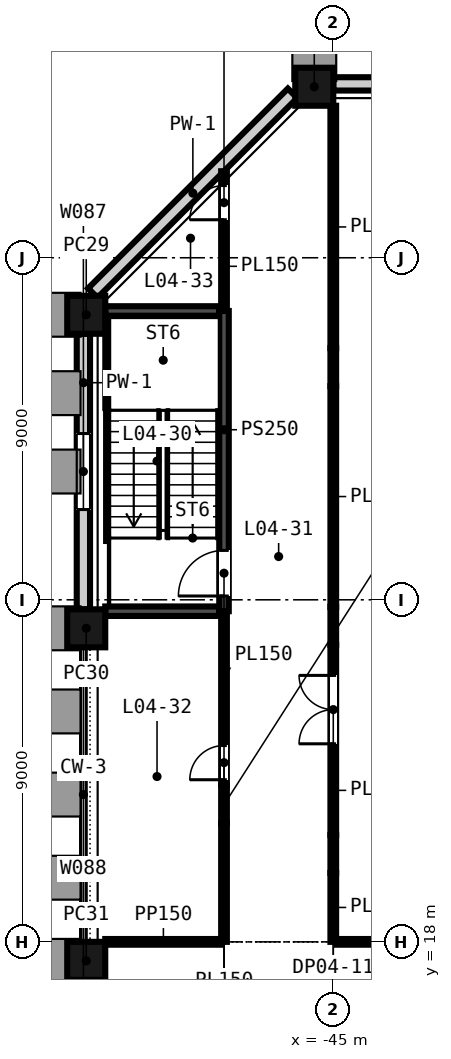
"""IFC4 building model, lengths in metres.
Left out: names, types, materials, properties, quantities, classifications, styles, units other than length and angle.
Written with IfcOpenShell. Run it as: python <this file> out.ifc"""

import sys

from ifc_helpers import new_model, si_unit, direction, frame, frame_2d, origin, origin_2d, place, context, subcontext, project, spatial, rectangle, extrude, element, fill, save


model = new_model("IFC4")
c1 = context("Model", 3, precision=1e-05, world=origin(), true_north=direction((0.0, 1.0)))
c2 = subcontext(c1, "Body", "Model", "MODEL_VIEW")
j1 = project(units=[si_unit("LENGTHUNIT", "METRE"), si_unit("PLANEANGLEUNIT", "RADIAN")], contexts=[c1])
p1 = place(None, origin())
s1 = spatial("IfcSite", under=j1, at=p1, CompositionType="ELEMENT")
p2 = place(p1, origin())
s2 = spatial("IfcBuilding", under=s1, at=p2, CompositionType="ELEMENT")
p3 = place(p2, frame((0.0, 0.0, 27.0)))
s3 = spatial("IfcBuildingStorey", under=s2, at=p3, CompositionType="ELEMENT", Elevation=27.0)
for number, where, z_axis, x_axis in (
    (1, (-45.5, 40.5, -0.3), (0.0, 0.0, 1.0), (-1.0, 0.0, 0.0)),
    (2, (-51.5, 34.5, -0.3), (0.0, 0.0, 1.0), (0.0, -1.0, 0.0)),
    (3, (-51.5, 26.25, -0.3), (0.0, 0.0, 1.0), (0.0, -1.0, 0.0)),
    (4, (-51.5, 17.5, -0.3), (0.0, 0.0, 1.0), (0.0, -1.0, 0.0)),
):
    element("IfcColumn", number, at=place(p3, frame(where, z_axis=z_axis, x_axis=x_axis)), inside=s3, PredefinedType="COLUMN", context=c2, shape_type="SweptSolid", body=[
        extrude(rectangle(XDim=1.0, YDim=1.0, at=origin_2d()), origin(), (0.0, 0.0, 1.0), 4.5),
    ])
p4 = place(p3, frame((-37.3, 40.575, -0.3), z_axis=(0.0, 0.0, 1.0), x_axis=(-1.0, 0.0, 0.0)))
e5 = element("IfcWall", 5, at=p4, inside=s3, PredefinedType="SOLIDWALL", context=c2, shape_type="SweptSolid", body=[
    extrude(rectangle(XDim=7.7, YDim=0.35, at=frame_2d((3.85, 0.0))), origin(), (0.0, 0.0, 1.0), 3.6),
])
p5 = place(p4, frame((2.85, 0.0, 1.2)))
e6 = element("IfcOpeningElement", 6, at=p5, cuts=e5, PredefinedType="OPENING", context=c2, shape_type="SweptSolid", body=[
    extrude(rectangle(XDim=2.0, YDim=2.35, at=frame_2d((1.0, 1.175))), frame((0.0, 0.185, 0.0), z_axis=(0.0, -1.0, 0.0), x_axis=(1.0, 0.0, 0.0)), (0.0, 0.0, 1.0), 0.37),
])
p6 = place(p3, frame((-46.072, 40.327, -0.3), z_axis=(0.0, 0.0, 1.0), x_axis=(-0.707106781187, -0.707106781187, 0.0)))
e7 = element("IfcWall", 7, at=p6, inside=s3, PredefinedType="SOLIDWALL", context=c2, shape_type="SweptSolid", body=[
    extrude(rectangle(XDim=7.433, YDim=0.35, at=frame_2d((3.716, 0.0))), origin(), (0.0, 0.0, 1.0), 3.6),
])
p7 = place(p3, frame((-51.575, 34.0, -0.3), z_axis=(0.0, 0.0, 1.0), x_axis=(0.0, -1.0, 0.0)))
e8 = element("IfcWall", 8, at=p7, inside=s3, PredefinedType="SOLIDWALL", context=c2, shape_type="SweptSolid", body=[
    extrude(rectangle(XDim=7.25, YDim=0.35, at=frame_2d((3.625, 0.0))), origin(), (0.0, 0.0, 1.0), 3.6),
])
p8 = place(p7, frame((2.625, 0.0, 1.2)))
e9 = element("IfcOpeningElement", 9, at=p8, cuts=e8, PredefinedType="OPENING", context=c2, shape_type="SweptSolid", body=[
    extrude(rectangle(XDim=2.0, YDim=2.35, at=frame_2d((1.0, 1.175))), frame((0.0, 0.185, 0.0), z_axis=(0.0, -1.0, 0.0), x_axis=(1.0, 0.0, 0.0)), (0.0, 0.0, 1.0), 0.37),
])
p9 = place(p3, frame((-51.0, 18.0, 0.0), z_axis=(0.0, 0.0, 1.0), x_axis=(1.0, 0.0, 0.0)))
e10 = element("IfcWall", 10, at=p9, inside=s3, PredefinedType="PARTITIONING", context=c2, shape_type="SweptSolid", body=[
    extrude(rectangle(XDim=3.05, YDim=0.15, at=frame_2d((1.525, 0.0))), origin(), (0.0, 0.0, 1.0), 4.2),
])
p10 = place(p3, frame((-44.925, 18.0, 0.0), z_axis=(0.0, 0.0, 1.0), x_axis=(1.0, 0.0, 0.0)))
e11 = element("IfcWall", 11, at=p10, inside=s3, PredefinedType="PARTITIONING", context=c2, shape_type="SweptSolid", body=[
    extrude(rectangle(XDim=4.353, YDim=0.15, at=frame_2d((2.176, 0.0))), origin(), (0.0, 0.0, 1.0), 4.2),
])
p11 = place(p10, frame((2.4, 0.0, 0.0)))
e12 = element("IfcOpeningElement", 12, at=p11, cuts=e11, PredefinedType="OPENING", context=c2, shape_type="SweptSolid", body=[
    extrude(rectangle(XDim=1.8, YDim=2.4, at=frame_2d((0.9, 1.2))), frame((0.0, 0.085, 0.0), z_axis=(0.0, -1.0, 0.0), x_axis=(1.0, 0.0, 0.0)), (0.0, 0.0, 1.0), 0.17),
])
for number, where, z_axis, x_axis in (
    (13, (-51.0, 26.7, 0.0), (0.0, 0.0, 1.0), (1.0, 0.0, 0.0)),
    (14, (-51.0, 34.6, 0.0), (0.0, 0.0, 1.0), (1.0, 0.0, 0.0)),
):
    element("IfcWall", number, at=place(p3, frame(where, z_axis=z_axis, x_axis=x_axis)), inside=s3, PredefinedType="SHEAR", context=c2, shape_type="SweptSolid", body=[
        extrude(rectangle(XDim=3.0, YDim=0.25, at=frame_2d((1.5, 0.0))), origin(), (0.0, 0.0, 1.0), 4.2),
    ])
p12 = place(p3, frame((-47.875, 18.0, 0.0), z_axis=(0.0, 0.0, 1.0), x_axis=(0.0, 1.0, 0.0)))
e15 = element("IfcWall", 15, at=p12, inside=s3, PredefinedType="PARTITIONING", context=c2, shape_type="SweptSolid", body=[
    extrude(rectangle(XDim=3.116, YDim=0.15, at=frame_2d((1.558, 0.0))), origin(), (0.0, 0.0, 1.0), 4.2),
])
p13 = place(p3, frame((-47.875, 21.116, 0.0), z_axis=(0.0, 0.0, 1.0), x_axis=(0.0, 1.0, 0.0)))
e16 = element("IfcWall", 16, at=p13, inside=s3, PredefinedType="PARTITIONING", context=c2, shape_type="SweptSolid", body=[
    extrude(rectangle(XDim=1.0, YDim=0.15, at=frame_2d((0.5, 0.0))), origin(), (0.0, 0.0, 1.0), 3.111),
])
p14 = place(p3, frame((-47.875, 22.116, 0.0), z_axis=(0.0, 0.0, 1.0), x_axis=(0.0, 1.0, 0.0)))
e17 = element("IfcWall", 17, at=p14, inside=s3, PredefinedType="PARTITIONING", context=c2, shape_type="SweptSolid", body=[
    extrude(rectangle(XDim=4.584, YDim=0.15, at=frame_2d((2.292, 0.0))), origin(), (0.0, 0.0, 1.0), 4.2),
])
p15 = place(p14, frame((0.15, 0.0, 0.0)))
e18 = element("IfcOpeningElement", 18, at=p15, cuts=e17, PredefinedType="OPENING", context=c2, shape_type="SweptSolid", body=[
    extrude(rectangle(XDim=0.9, YDim=2.1, at=frame_2d((0.45, 1.05))), frame((0.0, 0.085, 0.0), z_axis=(0.0, -1.0, 0.0), x_axis=(1.0, 0.0, 0.0)), (0.0, 0.0, 1.0), 0.17),
])
p16 = place(p3, frame((-47.875, 26.7, 0.0), z_axis=(0.0, 0.0, 1.0), x_axis=(0.0, 1.0, 0.0)))
e19 = element("IfcWall", 19, at=p16, inside=s3, PredefinedType="SHEAR", context=c2, shape_type="SweptSolid", body=[
    extrude(rectangle(XDim=7.9, YDim=0.25, at=frame_2d((3.95, 0.0))), origin(), (0.0, 0.0, 1.0), 4.2),
])
p17 = place(p16, frame((0.4, 0.0, 0.0)))
e20 = element("IfcOpeningElement", 20, at=p17, cuts=e19, PredefinedType="OPENING", context=c2, shape_type="SweptSolid", body=[
    extrude(rectangle(XDim=1.2, YDim=2.1, at=frame_2d((0.6, 1.05))), frame((0.0, 0.135, 0.0), z_axis=(0.0, -1.0, 0.0), x_axis=(1.0, 0.0, 0.0)), (0.0, 0.0, 1.0), 0.27),
])
p18 = place(p3, frame((-47.875, 34.6, 0.0), z_axis=(0.0, 0.0, 1.0), x_axis=(0.0, 1.0, 0.0)))
e21 = element("IfcWall", 21, at=p18, inside=s3, PredefinedType="PARTITIONING", context=c2, shape_type="SweptSolid", body=[
    extrude(rectangle(XDim=3.677, YDim=0.15, at=frame_2d((1.838, 0.0))), origin(), (0.0, 0.0, 1.0), 3.667),
])
p19 = place(p18, frame((2.4, 0.0, 0.0)))
e22 = element("IfcOpeningElement", 22, at=p19, cuts=e21, PredefinedType="OPENING", context=c2, shape_type="SweptSolid", body=[
    extrude(rectangle(XDim=0.9, YDim=2.1, at=frame_2d((0.45, 1.05))), frame((0.0, 0.085, 0.0), z_axis=(0.0, -1.0, 0.0), x_axis=(1.0, 0.0, 0.0)), (0.0, 0.0, 1.0), 0.17),
])
p20 = place(p3, frame((-45.0, 18.0, 0.0), z_axis=(0.0, 0.0, 1.0), x_axis=(0.0, 1.0, 0.0)))
e23 = element("IfcWall", 23, at=p20, inside=s3, PredefinedType="PARTITIONING", context=c2, shape_type="SweptSolid", body=[
    extrude(rectangle(XDim=1.811, YDim=0.15, at=frame_2d((0.906, 0.0))), origin(), (0.0, 0.0, 1.0), 4.2),
])
p21 = place(p3, frame((-45.0, 19.811, 0.0), z_axis=(0.0, 0.0, 1.0), x_axis=(0.0, 1.0, 0.0)))
e24 = element("IfcWall", 24, at=p21, inside=s3, PredefinedType="PARTITIONING", context=c2, shape_type="SweptSolid", body=[
    extrude(rectangle(XDim=1.0, YDim=0.15, at=frame_2d((0.5, 0.0))), origin(), (0.0, 0.0, 1.0), 3.111),
])
p22 = place(p3, frame((-45.0, 20.811, 0.0), z_axis=(0.0, 0.0, 1.0), x_axis=(0.0, 1.0, 0.0)))
e25 = element("IfcWall", 25, at=p22, inside=s3, PredefinedType="PARTITIONING", context=c2, shape_type="SweptSolid", body=[
    extrude(rectangle(XDim=5.002, YDim=0.15, at=frame_2d((2.501, 0.0))), origin(), (0.0, 0.0, 1.0), 4.2),
])
p23 = place(p22, frame((2.4, 0.0, 0.0)))
e26 = element("IfcOpeningElement", 26, at=p23, cuts=e25, PredefinedType="OPENING", context=c2, shape_type="SweptSolid", body=[
    extrude(rectangle(XDim=1.8, YDim=2.4, at=frame_2d((0.9, 1.2))), frame((0.0, 0.085, 0.0), z_axis=(0.0, -1.0, 0.0), x_axis=(1.0, 0.0, 0.0)), (0.0, 0.0, 1.0), 0.17),
])
p24 = place(p3, frame((-45.0, 25.813, 0.0), z_axis=(0.0, 0.0, 1.0), x_axis=(0.0, 1.0, 0.0)))
e27 = element("IfcWall", 27, at=p24, inside=s3, PredefinedType="PARTITIONING", context=c2, shape_type="SweptSolid", body=[
    extrude(rectangle(XDim=1.0, YDim=0.15, at=frame_2d((0.5, 0.0))), origin(), (0.0, 0.0, 1.0), 3.111),
])
p25 = place(p3, frame((-45.0, 26.813, 0.0), z_axis=(0.0, 0.0, 1.0), x_axis=(0.0, 1.0, 0.0)))
e28 = element("IfcWall", 28, at=p25, inside=s3, PredefinedType="PARTITIONING", context=c2, shape_type="SweptSolid", body=[
    extrude(rectangle(XDim=5.808, YDim=0.15, at=frame_2d((2.904, 0.0))), origin(), (0.0, 0.0, 1.0), 4.2),
])
p26 = place(p3, frame((-45.0, 32.621, 0.0), z_axis=(0.0, 0.0, 1.0), x_axis=(0.0, 1.0, 0.0)))
e29 = element("IfcWall", 29, at=p26, inside=s3, PredefinedType="PARTITIONING", context=c2, shape_type="SweptSolid", body=[
    extrude(rectangle(XDim=1.0, YDim=0.15, at=frame_2d((0.5, 0.0))), origin(), (0.0, 0.0, 1.0), 3.111),
])
p27 = place(p3, frame((-45.0, 33.621, 0.0), z_axis=(0.0, 0.0, 1.0), x_axis=(0.0, 1.0, 0.0)))
e30 = element("IfcWall", 30, at=p27, inside=s3, PredefinedType="PARTITIONING", context=c2, shape_type="SweptSolid", body=[
    extrude(rectangle(XDim=6.379, YDim=0.15, at=frame_2d((3.189, 0.0))), origin(), (0.0, 0.0, 1.0), 4.2),
])
p28 = place(p8, origin())
e31 = element("IfcWindow", 31, at=p28, inside=s3, PartitioningType="SINGLE_PANEL", PredefinedType="WINDOW", context=c2, shape_type="SweptSolid", body=[
    extrude(rectangle(XDim=2.0, YDim=2.35, at=frame_2d((1.0, 1.175))), frame((0.0, 0.03, 0.0), z_axis=(0.0, -1.0, 0.0), x_axis=(1.0, 0.0, 0.0)), (0.0, 0.0, 1.0), 0.06),
])
fill(e9, e31)
p29 = place(p17, origin())
e32 = element("IfcDoor", 32, at=p29, inside=s3, OperationType="SINGLE_SWING_LEFT", PredefinedType="DOOR", context=c2, shape_type="SweptSolid", body=[
    extrude(rectangle(XDim=1.2, YDim=2.1, at=frame_2d((0.6, 1.05))), frame((0.0, 0.025, 0.0), z_axis=(0.0, -1.0, 0.0), x_axis=(1.0, 0.0, 0.0)), (0.0, 0.0, 1.0), 0.05),
])
fill(e20, e32)
p30 = place(p15, origin())
e33 = element("IfcDoor", 33, at=p30, inside=s3, OperationType="SINGLE_SWING_LEFT", PredefinedType="DOOR", context=c2, shape_type="SweptSolid", body=[
    extrude(rectangle(XDim=0.9, YDim=2.1, at=frame_2d((0.45, 1.05))), frame((0.0, 0.025, 0.0), z_axis=(0.0, -1.0, 0.0), x_axis=(1.0, 0.0, 0.0)), (0.0, 0.0, 1.0), 0.05),
])
fill(e18, e33)
p31 = place(p19, origin())
e34 = element("IfcDoor", 34, at=p31, inside=s3, OperationType="SINGLE_SWING_LEFT", PredefinedType="DOOR", context=c2, shape_type="SweptSolid", body=[
    extrude(rectangle(XDim=0.9, YDim=2.1, at=frame_2d((0.45, 1.05))), frame((0.0, 0.025, 0.0), z_axis=(0.0, -1.0, 0.0), x_axis=(1.0, 0.0, 0.0)), (0.0, 0.0, 1.0), 0.05),
])
fill(e22, e34)
p32 = place(p23, origin())
e35 = element("IfcDoor", 35, at=p32, inside=s3, OperationType="SINGLE_SWING_LEFT", PredefinedType="DOOR", context=c2, shape_type="SweptSolid", body=[
    extrude(rectangle(XDim=1.8, YDim=2.4, at=frame_2d((0.9, 1.2))), frame((0.0, 0.025, 0.0), z_axis=(0.0, -1.0, 0.0), x_axis=(1.0, 0.0, 0.0)), (0.0, 0.0, 1.0), 0.05),
])
fill(e26, e35)
save(model, sys.argv[1])
